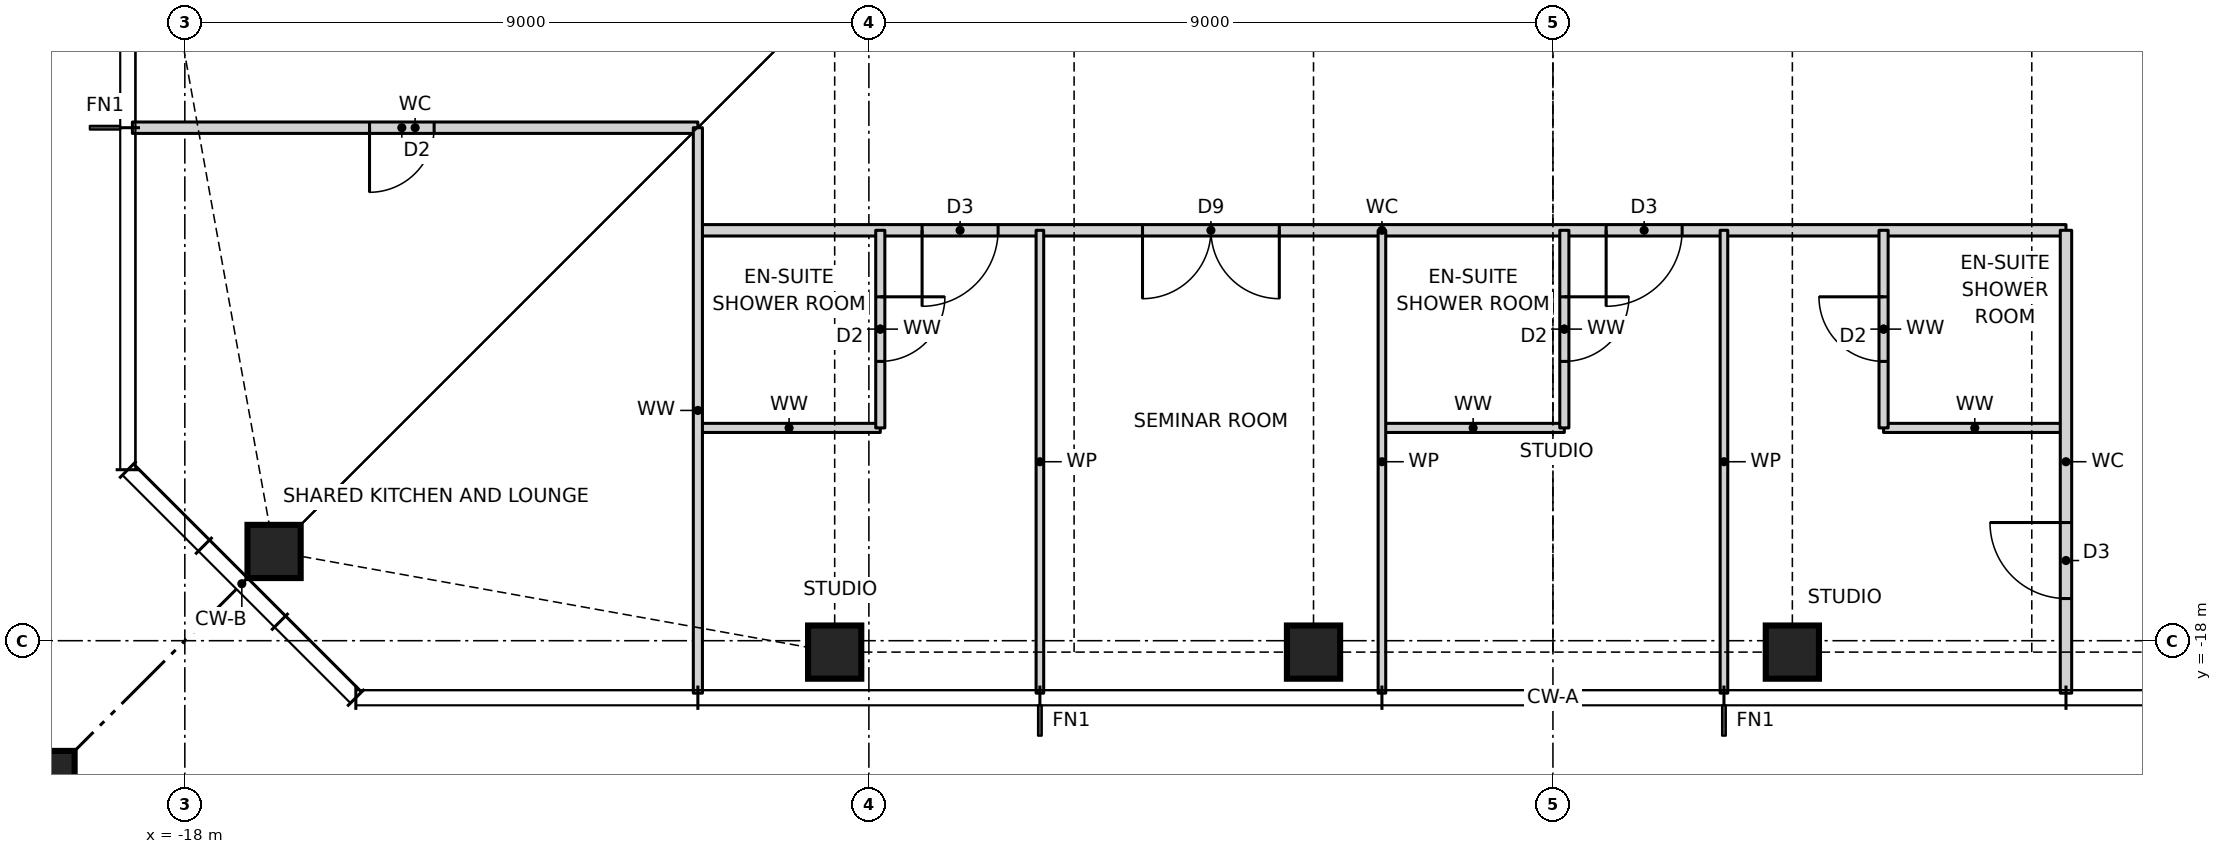
"""IFC4 building model, lengths in metres.
Left out: names, types, materials, properties, quantities, classifications, styles, units other than length and angle.
Written with IfcOpenShell. Run it as: python <this file> out.ifc"""

import sys

from ifc_helpers import new_model, si_unit, direction, frame, frame_2d, origin, origin_2d, place, context, subcontext, project, spatial, rectangle, hollow_rectangle, i_section, extrude, element, fill, save


model = new_model("IFC4")
c1 = context("Model", 3, precision=1e-05, world=origin(), true_north=direction((0.0, 1.0)))
c2 = subcontext(c1, "Body", "Model", "MODEL_VIEW")
j1 = project(units=[si_unit("LENGTHUNIT", "METRE"), si_unit("PLANEANGLEUNIT", "RADIAN")], contexts=[c1])
p1 = place(None, origin())
s1 = spatial("IfcSite", under=j1, at=p1, CompositionType="ELEMENT")
p2 = place(p1, origin())
s2 = spatial("IfcBuilding", under=s1, at=p2, CompositionType="ELEMENT")
p3 = place(p2, frame((0.0, 0.0, 153.0)))
s3 = spatial("IfcBuildingStorey", under=s2, at=p3, CompositionType="ELEMENT", Elevation=153.0)
for number, where, z_axis, x_axis in (
    (1, (-16.826, -16.826, 0.0), (0.0, 0.0, 1.0), (1.0, 0.0, 0.0)),
    (2, (-9.45, -18.15, 0.0), (0.0, 0.0, 1.0), (1.0, 0.0, 0.0)),
    (3, (-3.15, -18.15, 0.0), (0.0, 0.0, 1.0), (1.0, 0.0, 0.0)),
    (4, (3.15, -18.15, 0.0), (0.0, 0.0, 1.0), (1.0, 0.0, 0.0)),
):
    element("IfcColumn", number, at=place(p3, frame(where, z_axis=z_axis, x_axis=x_axis)), inside=s3, PredefinedType="COLUMN", context=c2, shape_type="SweptSolid", body=[
        extrude(hollow_rectangle(XDim=0.7, YDim=0.7, WallThickness=0.06, at=origin_2d()), origin(), (0.0, 0.0, 1.0), 3.5),
    ])
p4 = place(p3, frame((-21.65, -21.65, 0.0), z_axis=(0.0, 0.0, 1.0), x_axis=(1.0, 0.0, 0.0)))
e5 = element("IfcColumn", 5, at=p4, inside=s3, PredefinedType="COLUMN", context=c2, shape_type="SweptSolid", body=[
    extrude(rectangle(XDim=4.4, YDim=4.4, at=origin_2d()), origin(), (0.0, 0.0, 1.0), 3.5),
    extrude(i_section(OverallWidth=0.478, OverallDepth=0.599, WebThickness=0.1, FlangeThickness=0.14, at=origin_2d()), origin(), (0.0, 0.0, 1.0), 3.5),
])
for number, where, z_axis, x_axis in (
    (6, (-11.25, -15.2, 0.0), (0.0, 0.0, 1.0), (1.0, 0.0, 0.0)),
    (7, (-2.25, -15.2, 0.0), (0.0, 0.0, 1.0), (1.0, 0.0, 0.0)),
    (8, (4.35, -15.2, 0.0), (0.0, 0.0, 1.0), (1.0, 0.0, 0.0)),
):
    element("IfcWall", number, at=place(p3, frame(where, z_axis=z_axis, x_axis=x_axis)), inside=s3, PredefinedType="PARTITIONING", context=c2, shape_type="SweptSolid", body=[
        extrude(rectangle(XDim=2.4, YDim=0.12, at=frame_2d((1.2, 0.0))), origin(), (0.0, 0.0, 1.0), 3.27),
    ])
p5 = place(p3, frame((-11.25, -12.6, 0.0), z_axis=(0.0, 0.0, 1.0), x_axis=(1.0, 0.0, 0.0)))
e9 = element("IfcWall", 9, at=p5, inside=s3, PredefinedType="PARTITIONING", context=c2, shape_type="SweptSolid", body=[
    extrude(rectangle(XDim=18.0, YDim=0.15, at=frame_2d((9.0, 0.0))), origin(), (0.0, 0.0, 1.0), 3.27),
])
p6 = place(p5, frame((2.95, 0.0, 0.0)))
e10 = element("IfcOpeningElement", 10, at=p6, cuts=e9, PredefinedType="OPENING", context=c2, shape_type="SweptSolid", body=[
    extrude(rectangle(XDim=1.0, YDim=2.1, at=frame_2d((0.5, 1.05))), frame((0.0, 0.085, 0.0), z_axis=(0.0, -1.0, 0.0), x_axis=(1.0, 0.0, 0.0)), (0.0, 0.0, 1.0), 0.17),
])
p7 = place(p5, frame((5.85, 0.0, 0.0)))
e11 = element("IfcOpeningElement", 11, at=p7, cuts=e9, PredefinedType="OPENING", context=c2, shape_type="SweptSolid", body=[
    extrude(rectangle(XDim=1.8, YDim=2.1, at=frame_2d((0.9, 1.05))), frame((0.0, 0.085, 0.0), z_axis=(0.0, -1.0, 0.0), x_axis=(1.0, 0.0, 0.0)), (0.0, 0.0, 1.0), 0.17),
])
p8 = place(p5, frame((11.95, 0.0, 0.0)))
e12 = element("IfcOpeningElement", 12, at=p8, cuts=e9, PredefinedType="OPENING", context=c2, shape_type="SweptSolid", body=[
    extrude(rectangle(XDim=1.0, YDim=2.1, at=frame_2d((0.5, 1.05))), frame((0.0, 0.085, 0.0), z_axis=(0.0, -1.0, 0.0), x_axis=(1.0, 0.0, 0.0)), (0.0, 0.0, 1.0), 0.17),
])
p9 = place(p3, frame((-18.69, -11.25, 0.0), z_axis=(0.0, 0.0, 1.0), x_axis=(1.0, 0.0, 0.0)))
e13 = element("IfcWall", 13, at=p9, inside=s3, PredefinedType="PARTITIONING", context=c2, shape_type="SweptSolid", body=[
    extrude(rectangle(XDim=7.44, YDim=0.15, at=frame_2d((3.72, 0.0))), origin(), (0.0, 0.0, 1.0), 3.27),
])
p10 = place(p9, frame((3.12, 0.0, 0.0)))
e14 = element("IfcOpeningElement", 14, at=p10, cuts=e13, PredefinedType="OPENING", context=c2, shape_type="SweptSolid", body=[
    extrude(rectangle(XDim=0.85, YDim=2.1, at=frame_2d((0.425, 1.05))), frame((0.0, 0.085, 0.0), z_axis=(0.0, -1.0, 0.0), x_axis=(1.0, 0.0, 0.0)), (0.0, 0.0, 1.0), 0.17),
])
p11 = place(p3, frame((6.75, -18.69, 0.0), z_axis=(0.0, 0.0, 1.0), x_axis=(0.0, 1.0, 0.0)))
e15 = element("IfcWall", 15, at=p11, inside=s3, PredefinedType="PARTITIONING", context=c2, shape_type="SweptSolid", body=[
    extrude(rectangle(XDim=6.09, YDim=0.15, at=frame_2d((3.045, 0.0))), origin(), (0.0, 0.0, 1.0), 3.27),
])
p12 = place(p11, frame((1.245, 0.0, 0.0)))
e16 = element("IfcOpeningElement", 16, at=p12, cuts=e15, PredefinedType="OPENING", context=c2, shape_type="SweptSolid", body=[
    extrude(rectangle(XDim=1.0, YDim=2.1, at=frame_2d((0.5, 1.05))), frame((0.0, 0.085, 0.0), z_axis=(0.0, -1.0, 0.0), x_axis=(1.0, 0.0, 0.0)), (0.0, 0.0, 1.0), 0.17),
])
p13 = place(p3, frame((4.35, -15.2, 0.0), z_axis=(0.0, 0.0, 1.0), x_axis=(0.0, 1.0, 0.0)))
e17 = element("IfcWall", 17, at=p13, inside=s3, PredefinedType="PARTITIONING", context=c2, shape_type="SweptSolid", body=[
    extrude(rectangle(XDim=2.6, YDim=0.12, at=frame_2d((1.3, 0.0))), origin(), (0.0, 0.0, 1.0), 3.27),
])
p14 = place(p13, frame((0.875, 0.0, 0.0)))
e18 = element("IfcOpeningElement", 18, at=p14, cuts=e17, PredefinedType="OPENING", context=c2, shape_type="SweptSolid", body=[
    extrude(rectangle(XDim=0.85, YDim=2.1, at=frame_2d((0.425, 1.05))), frame((0.0, 0.07, 0.0), z_axis=(0.0, -1.0, 0.0), x_axis=(1.0, 0.0, 0.0)), (0.0, 0.0, 1.0), 0.14),
])
p15 = place(p3, frame((2.25, -18.69, 0.0), z_axis=(0.0, 0.0, 1.0), x_axis=(0.0, 1.0, 0.0)))
e19 = element("IfcWall", 19, at=p15, inside=s3, PredefinedType="PARTITIONING", context=c2, shape_type="SweptSolid", body=[
    extrude(rectangle(XDim=6.09, YDim=0.1, at=frame_2d((3.045, 0.0))), origin(), (0.0, 0.0, 1.0), 3.27),
])
p16 = place(p3, frame((0.15, -15.2, 0.0), z_axis=(0.0, 0.0, 1.0), x_axis=(0.0, 1.0, 0.0)))
e20 = element("IfcWall", 20, at=p16, inside=s3, PredefinedType="PARTITIONING", context=c2, shape_type="SweptSolid", body=[
    extrude(rectangle(XDim=2.6, YDim=0.12, at=frame_2d((1.3, 0.0))), origin(), (0.0, 0.0, 1.0), 3.27),
])
p17 = place(p16, frame((0.875, 0.0, 0.0)))
e21 = element("IfcOpeningElement", 21, at=p17, cuts=e20, PredefinedType="OPENING", context=c2, shape_type="SweptSolid", body=[
    extrude(rectangle(XDim=0.85, YDim=2.1, at=frame_2d((0.425, 1.05))), frame((0.0, 0.07, 0.0), z_axis=(0.0, -1.0, 0.0), x_axis=(1.0, 0.0, 0.0)), (0.0, 0.0, 1.0), 0.14),
])
for number, where, z_axis, x_axis in (
    (22, (-2.25, -18.69, 0.0), (0.0, 0.0, 1.0), (0.0, 1.0, 0.0)),
    (23, (-6.75, -18.69, 0.0), (0.0, 0.0, 1.0), (0.0, 1.0, 0.0)),
):
    element("IfcWall", number, at=place(p3, frame(where, z_axis=z_axis, x_axis=x_axis)), inside=s3, PredefinedType="PARTITIONING", context=c2, shape_type="SweptSolid", body=[
        extrude(rectangle(XDim=6.09, YDim=0.1, at=frame_2d((3.045, 0.0))), origin(), (0.0, 0.0, 1.0), 3.27),
    ])
p18 = place(p3, frame((-8.85, -15.2, 0.0), z_axis=(0.0, 0.0, 1.0), x_axis=(0.0, 1.0, 0.0)))
e24 = element("IfcWall", 24, at=p18, inside=s3, PredefinedType="PARTITIONING", context=c2, shape_type="SweptSolid", body=[
    extrude(rectangle(XDim=2.6, YDim=0.12, at=frame_2d((1.3, 0.0))), origin(), (0.0, 0.0, 1.0), 3.27),
])
p19 = place(p18, frame((0.875, 0.0, 0.0)))
e25 = element("IfcOpeningElement", 25, at=p19, cuts=e24, PredefinedType="OPENING", context=c2, shape_type="SweptSolid", body=[
    extrude(rectangle(XDim=0.85, YDim=2.1, at=frame_2d((0.425, 1.05))), frame((0.0, 0.07, 0.0), z_axis=(0.0, -1.0, 0.0), x_axis=(1.0, 0.0, 0.0)), (0.0, 0.0, 1.0), 0.14),
])
p20 = place(p3, frame((-11.25, -18.69, 0.0), z_axis=(0.0, 0.0, 1.0), x_axis=(0.0, 1.0, 0.0)))
e26 = element("IfcWall", 26, at=p20, inside=s3, PredefinedType="PARTITIONING", context=c2, shape_type="SweptSolid", body=[
    extrude(rectangle(XDim=7.44, YDim=0.12, at=frame_2d((3.72, 0.0))), origin(), (0.0, 0.0, 1.0), 3.27),
])
p21 = place(p6, frame((1.0, 0.0, 0.0), z_axis=(0.0, 0.0, 1.0), x_axis=(-1.0, 0.0, 0.0)))
e27 = element("IfcDoor", 27, at=p21, inside=s3, OperationType="SINGLE_SWING_RIGHT", PredefinedType="DOOR", context=c2, shape_type="SweptSolid", body=[
    extrude(rectangle(XDim=1.0, YDim=2.1, at=frame_2d((0.5, 1.05))), frame((0.0, 0.025, 0.0), z_axis=(0.0, -1.0, 0.0), x_axis=(1.0, 0.0, 0.0)), (0.0, 0.0, 1.0), 0.05),
])
fill(e10, e27)
p22 = place(p19, frame((0.85, 0.0, 0.0), z_axis=(0.0, 0.0, 1.0), x_axis=(-1.0, 0.0, 0.0)))
e28 = element("IfcDoor", 28, at=p22, inside=s3, OperationType="SINGLE_SWING_LEFT", PredefinedType="DOOR", context=c2, shape_type="SweptSolid", body=[
    extrude(rectangle(XDim=0.85, YDim=2.1, at=frame_2d((0.425, 1.05))), frame((0.0, 0.025, 0.0), z_axis=(0.0, -1.0, 0.0), x_axis=(1.0, 0.0, 0.0)), (0.0, 0.0, 1.0), 0.05),
])
fill(e25, e28)
p23 = place(p7, frame((1.8, 0.0, 0.0), z_axis=(0.0, 0.0, 1.0), x_axis=(-1.0, 0.0, 0.0)))
e29 = element("IfcDoor", 29, at=p23, inside=s3, OperationType="DOUBLE_DOOR_SINGLE_SWING", PredefinedType="DOOR", context=c2, shape_type="SweptSolid", body=[
    extrude(rectangle(XDim=1.8, YDim=2.1, at=frame_2d((0.9, 1.05))), frame((0.0, 0.025, 0.0), z_axis=(0.0, -1.0, 0.0), x_axis=(1.0, 0.0, 0.0)), (0.0, 0.0, 1.0), 0.05),
])
fill(e11, e29)
p24 = place(p8, frame((1.0, 0.0, 0.0), z_axis=(0.0, 0.0, 1.0), x_axis=(-1.0, 0.0, 0.0)))
e30 = element("IfcDoor", 30, at=p24, inside=s3, OperationType="SINGLE_SWING_RIGHT", PredefinedType="DOOR", context=c2, shape_type="SweptSolid", body=[
    extrude(rectangle(XDim=1.0, YDim=2.1, at=frame_2d((0.5, 1.05))), frame((0.0, 0.025, 0.0), z_axis=(0.0, -1.0, 0.0), x_axis=(1.0, 0.0, 0.0)), (0.0, 0.0, 1.0), 0.05),
])
fill(e12, e30)
p25 = place(p17, frame((0.85, 0.0, 0.0), z_axis=(0.0, 0.0, 1.0), x_axis=(-1.0, 0.0, 0.0)))
e31 = element("IfcDoor", 31, at=p25, inside=s3, OperationType="SINGLE_SWING_LEFT", PredefinedType="DOOR", context=c2, shape_type="SweptSolid", body=[
    extrude(rectangle(XDim=0.85, YDim=2.1, at=frame_2d((0.425, 1.05))), frame((0.0, 0.025, 0.0), z_axis=(0.0, -1.0, 0.0), x_axis=(1.0, 0.0, 0.0)), (0.0, 0.0, 1.0), 0.05),
])
fill(e21, e31)
p26 = place(p12, origin())
e32 = element("IfcDoor", 32, at=p26, inside=s3, OperationType="SINGLE_SWING_RIGHT", PredefinedType="DOOR", context=c2, shape_type="SweptSolid", body=[
    extrude(rectangle(XDim=1.0, YDim=2.1, at=frame_2d((0.5, 1.05))), frame((0.0, 0.025, 0.0), z_axis=(0.0, -1.0, 0.0), x_axis=(1.0, 0.0, 0.0)), (0.0, 0.0, 1.0), 0.05),
])
fill(e16, e32)
p27 = place(p14, origin())
e33 = element("IfcDoor", 33, at=p27, inside=s3, OperationType="SINGLE_SWING_RIGHT", PredefinedType="DOOR", context=c2, shape_type="SweptSolid", body=[
    extrude(rectangle(XDim=0.85, YDim=2.1, at=frame_2d((0.425, 1.05))), frame((0.0, 0.025, 0.0), z_axis=(0.0, -1.0, 0.0), x_axis=(1.0, 0.0, 0.0)), (0.0, 0.0, 1.0), 0.05),
])
fill(e18, e33)
p28 = place(p10, frame((0.85, 0.0, 0.0), z_axis=(0.0, 0.0, 1.0), x_axis=(-1.0, 0.0, 0.0)))
e34 = element("IfcDoor", 34, at=p28, inside=s3, OperationType="SINGLE_SWING_RIGHT", PredefinedType="DOOR", context=c2, shape_type="SweptSolid", body=[
    extrude(rectangle(XDim=0.85, YDim=2.1, at=frame_2d((0.425, 1.05))), frame((0.0, 0.025, 0.0), z_axis=(0.0, -1.0, 0.0), x_axis=(1.0, 0.0, 0.0)), (0.0, 0.0, 1.0), 0.05),
])
fill(e14, e34)
save(model, sys.argv[1])
